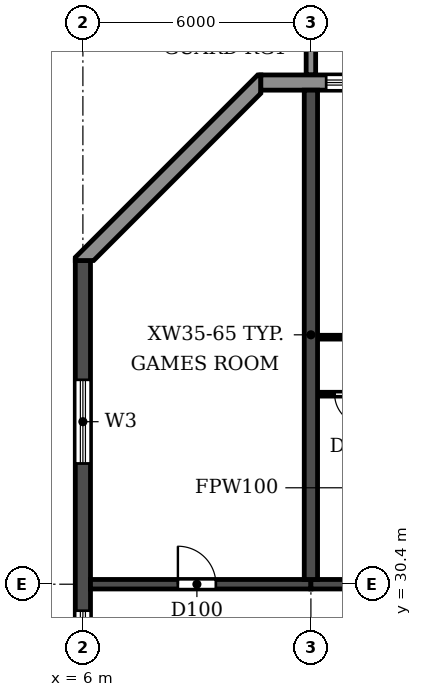
"""IFC4 building model, lengths in metres.
Left out: names, types, materials, properties, quantities, classifications, styles, units other than length and angle.
Written with IfcOpenShell. Run it as: python <this file> out.ifc"""

import sys

from ifc_helpers import new_model, si_unit, direction, frame, frame_2d, origin, place, context, subcontext, project, spatial, polyline, rectangle, outline, extrude, source, transform, mapped, element, fill, save


model = new_model("IFC4")
c1 = context("Model", 3, precision=1e-05, world=origin(), true_north=direction((0.0, 1.0)))
c2 = subcontext(c1, "Body", "Model", "MODEL_VIEW")
j1 = project(units=[si_unit("LENGTHUNIT", "METRE"), si_unit("PLANEANGLEUNIT", "RADIAN")], contexts=[c1])
p1 = place(None, origin())
s1 = spatial("IfcSite", under=j1, at=p1, CompositionType="ELEMENT")
p2 = place(p1, origin())
s2 = spatial("IfcBuilding", under=s1, at=p2, CompositionType="ELEMENT")
p3 = place(p2, frame((0.0, 0.0, 72.9)))
s3 = spatial("IfcBuildingStorey", under=s2, at=p3, CompositionType="ELEMENT", Elevation=72.9)
p4 = place(p3, frame((12.0, 30.525, 0.0), z_axis=(0.0, 0.0, 1.0), x_axis=(0.0, 1.0, 0.0)))
e1 = element("IfcWall", 1, at=p4, inside=s3, PredefinedType="SHEAR", context=c2, shape_type="SweptSolid", body=[
    extrude(rectangle(XDim=12.875, YDim=0.35, at=frame_2d((6.438, 0.0))), origin(), (0.0, 0.0, 1.0), 3.06),
])
p5 = place(p3, frame((6.0, 4.683, 0.0), z_axis=(0.0, 0.0, 1.0), x_axis=(0.0, 1.0, 0.0)))
e2 = element("IfcWall", 2, at=p5, inside=s3, PredefinedType="SHEAR", context=c2, shape_type="SweptSolid", body=[
    extrude(rectangle(XDim=34.234, YDim=0.4, at=frame_2d((17.117, 0.0))), origin(), (0.0, 0.0, 1.0), 3.06),
])
p6 = place(p5, frame((23.817, 0.0, 0.9)))
e3 = element("IfcOpeningElement", 3, at=p6, cuts=e2, PredefinedType="OPENING", context=c2, shape_type="SweptSolid", body=[
    extrude(rectangle(XDim=1.2, YDim=1.5, at=frame_2d((0.6, 0.75))), frame((0.0, 0.21, 0.0), z_axis=(0.0, -1.0, 0.0), x_axis=(1.0, 0.0, 0.0)), (0.0, 0.0, 1.0), 0.42),
])
p7 = place(p5, frame((8.017, 0.0, 0.9)))
e4 = element("IfcOpeningElement", 4, at=p7, cuts=e2, PredefinedType="OPENING", context=c2, shape_type="SweptSolid", body=[
    extrude(rectangle(XDim=1.2, YDim=1.5, at=frame_2d((0.6, 0.75))), frame((0.0, 0.21, 0.0), z_axis=(0.0, -1.0, 0.0), x_axis=(1.0, 0.0, 0.0)), (0.0, 0.0, 1.0), 0.42),
])
p8 = place(p5, frame((15.917, 0.0, 0.9)))
e5 = element("IfcOpeningElement", 5, at=p8, cuts=e2, PredefinedType="OPENING", context=c2, shape_type="SweptSolid", body=[
    extrude(rectangle(XDim=1.2, YDim=1.5, at=frame_2d((0.6, 0.75))), frame((0.0, 0.21, 0.0), z_axis=(0.0, -1.0, 0.0), x_axis=(1.0, 0.0, 0.0)), (0.0, 0.0, 1.0), 0.42),
])
p9 = place(p5, frame((28.894, 0.0, 0.6)))
e6 = element("IfcOpeningElement", 6, at=p9, cuts=e2, PredefinedType="OPENING", context=c2, shape_type="SweptSolid", body=[
    extrude(rectangle(XDim=2.2, YDim=1.8, at=frame_2d((1.1, 0.9))), frame((0.0, 0.21, 0.0), z_axis=(0.0, -1.0, 0.0), x_axis=(1.0, 0.0, 0.0)), (0.0, 0.0, 1.0), 0.42),
])
p10 = place(p5, frame((2.541, 0.0, 0.6)))
e7 = element("IfcOpeningElement", 7, at=p10, cuts=e2, PredefinedType="OPENING", context=c2, shape_type="SweptSolid", body=[
    extrude(rectangle(XDim=2.2, YDim=1.8, at=frame_2d((1.1, 0.9))), frame((0.0, 0.21, 0.0), z_axis=(0.0, -1.0, 0.0), x_axis=(1.0, 0.0, 0.0)), (0.0, 0.0, 1.0), 0.42),
])
p11 = place(p3, frame((6.2, 30.4, 0.0), z_axis=(0.0, 0.0, 1.0), x_axis=(1.0, 0.0, 0.0)))
e8 = element("IfcWall", 8, at=p11, inside=s3, PredefinedType="SHEAR", context=c2, shape_type="SweptSolid", body=[
    extrude(rectangle(XDim=5.8, YDim=0.25, at=frame_2d((2.9, 0.0))), origin(), (0.0, 0.0, 1.0), 2.46),
])
p12 = place(p11, frame((2.3, 0.0, 0.0)))
e9 = element("IfcOpeningElement", 9, at=p12, cuts=e8, PredefinedType="OPENING", context=c2, shape_type="SweptSolid", body=[
    extrude(rectangle(XDim=1.0, YDim=2.1, at=frame_2d((0.5, 1.05))), frame((0.0, 0.135, 0.0), z_axis=(0.0, -1.0, 0.0), x_axis=(1.0, 0.0, 0.0)), (0.0, 0.0, 1.0), 0.27),
])
p13 = place(p3, frame((12.0, 30.4, 0.0), z_axis=(0.0, 0.0, 1.0), x_axis=(1.0, 0.0, 0.0)))
e10 = element("IfcWall", 10, at=p13, inside=s3, PredefinedType="SHEAR", context=c2, shape_type="SweptSolid", body=[
    extrude(rectangle(XDim=6.0, YDim=0.25, at=frame_2d((3.0, 0.0))), origin(), (0.0, 0.0, 1.0), 2.46),
])
p14 = place(p13, frame((2.45, 0.0, 0.0)))
e11 = element("IfcOpeningElement", 11, at=p14, cuts=e10, PredefinedType="OPENING", context=c2, shape_type="SweptSolid", body=[
    extrude(rectangle(XDim=1.0, YDim=2.1, at=frame_2d((0.5, 1.05))), frame((0.0, 0.135, 0.0), z_axis=(0.0, -1.0, 0.0), x_axis=(1.0, 0.0, 0.0)), (0.0, 0.0, 1.0), 0.27),
])
p15 = place(p3, frame((91.317, 43.6, 0.0), z_axis=(0.0, 0.0, 1.0), x_axis=(-1.0, 0.0, 0.0)))
e12 = element("IfcWall", 12, at=p15, inside=s3, PredefinedType="STANDARD", context=c2, shape_type="SweptSolid", body=[
    extrude(rectangle(XDim=80.634, YDim=0.4, at=frame_2d((40.317, 0.0))), origin(), (0.0, 0.0, 1.0), 3.06),
])
p16 = place(p15, frame((76.717, 0.0, 0.9)))
e13 = element("IfcOpeningElement", 13, at=p16, cuts=e12, PredefinedType="OPENING", context=c2, shape_type="SweptSolid", body=[
    extrude(rectangle(XDim=2.2, YDim=1.5, at=frame_2d((1.1, 0.75))), frame((0.0, 0.21, 0.0), z_axis=(0.0, -1.0, 0.0), x_axis=(1.0, 0.0, 0.0)), (0.0, 0.0, 1.0), 0.42),
])
p17 = place(p15, frame((73.917, 0.0, 0.0)))
e14 = element("IfcOpeningElement", 14, at=p17, cuts=e12, PredefinedType="OPENING", context=c2, shape_type="SweptSolid", body=[
    extrude(rectangle(XDim=1.8, YDim=2.4, at=frame_2d((0.9, 1.2))), frame((0.0, 0.21, 0.0), z_axis=(0.0, -1.0, 0.0), x_axis=(1.0, 0.0, 0.0)), (0.0, 0.0, 1.0), 0.42),
])
p18 = place(p15, frame((70.917, 0.0, 0.0)))
e15 = element("IfcOpeningElement", 15, at=p18, cuts=e12, PredefinedType="OPENING", context=c2, shape_type="SweptSolid", body=[
    extrude(rectangle(XDim=1.8, YDim=2.4, at=frame_2d((0.9, 1.2))), frame((0.0, 0.21, 0.0), z_axis=(0.0, -1.0, 0.0), x_axis=(1.0, 0.0, 0.0)), (0.0, 0.0, 1.0), 0.42),
])
p19 = place(p15, frame((67.717, 0.0, 0.9)))
e16 = element("IfcOpeningElement", 16, at=p19, cuts=e12, PredefinedType="OPENING", context=c2, shape_type="SweptSolid", body=[
    extrude(rectangle(XDim=2.2, YDim=1.5, at=frame_2d((1.1, 0.75))), frame((0.0, 0.21, 0.0), z_axis=(0.0, -1.0, 0.0), x_axis=(1.0, 0.0, 0.0)), (0.0, 0.0, 1.0), 0.42),
])
p20 = place(p15, frame((64.717, 0.0, 0.9)))
e17 = element("IfcOpeningElement", 17, at=p20, cuts=e12, PredefinedType="OPENING", context=c2, shape_type="SweptSolid", body=[
    extrude(rectangle(XDim=2.2, YDim=1.5, at=frame_2d((1.1, 0.75))), frame((0.0, 0.21, 0.0), z_axis=(0.0, -1.0, 0.0), x_axis=(1.0, 0.0, 0.0)), (0.0, 0.0, 1.0), 0.42),
])
p21 = place(p15, frame((61.917, 0.0, 0.0)))
e18 = element("IfcOpeningElement", 18, at=p21, cuts=e12, PredefinedType="OPENING", context=c2, shape_type="SweptSolid", body=[
    extrude(rectangle(XDim=1.8, YDim=2.4, at=frame_2d((0.9, 1.2))), frame((0.0, 0.21, 0.0), z_axis=(0.0, -1.0, 0.0), x_axis=(1.0, 0.0, 0.0)), (0.0, 0.0, 1.0), 0.42),
])
p22 = place(p15, frame((58.717, 0.0, 0.9)))
e19 = element("IfcOpeningElement", 19, at=p22, cuts=e12, PredefinedType="OPENING", context=c2, shape_type="SweptSolid", body=[
    extrude(rectangle(XDim=2.2, YDim=1.5, at=frame_2d((1.1, 0.75))), frame((0.0, 0.21, 0.0), z_axis=(0.0, -1.0, 0.0), x_axis=(1.0, 0.0, 0.0)), (0.0, 0.0, 1.0), 0.42),
])
p23 = place(p15, frame((55.917, 0.0, 0.0)))
e20 = element("IfcOpeningElement", 20, at=p23, cuts=e12, PredefinedType="OPENING", context=c2, shape_type="SweptSolid", body=[
    extrude(rectangle(XDim=1.8, YDim=2.4, at=frame_2d((0.9, 1.2))), frame((0.0, 0.21, 0.0), z_axis=(0.0, -1.0, 0.0), x_axis=(1.0, 0.0, 0.0)), (0.0, 0.0, 1.0), 0.42),
])
p24 = place(p15, frame((52.717, 0.0, 0.9)))
e21 = element("IfcOpeningElement", 21, at=p24, cuts=e12, PredefinedType="OPENING", context=c2, shape_type="SweptSolid", body=[
    extrude(rectangle(XDim=2.2, YDim=1.5, at=frame_2d((1.1, 0.75))), frame((0.0, 0.21, 0.0), z_axis=(0.0, -1.0, 0.0), x_axis=(1.0, 0.0, 0.0)), (0.0, 0.0, 1.0), 0.42),
])
p25 = place(p15, frame((49.717, 0.0, 0.9)))
e22 = element("IfcOpeningElement", 22, at=p25, cuts=e12, PredefinedType="OPENING", context=c2, shape_type="SweptSolid", body=[
    extrude(rectangle(XDim=2.2, YDim=1.5, at=frame_2d((1.1, 0.75))), frame((0.0, 0.21, 0.0), z_axis=(0.0, -1.0, 0.0), x_axis=(1.0, 0.0, 0.0)), (0.0, 0.0, 1.0), 0.42),
])
p26 = place(p15, frame((46.917, 0.0, 0.0)))
e23 = element("IfcOpeningElement", 23, at=p26, cuts=e12, PredefinedType="OPENING", context=c2, shape_type="SweptSolid", body=[
    extrude(rectangle(XDim=1.8, YDim=2.4, at=frame_2d((0.9, 1.2))), frame((0.0, 0.21, 0.0), z_axis=(0.0, -1.0, 0.0), x_axis=(1.0, 0.0, 0.0)), (0.0, 0.0, 1.0), 0.42),
])
p27 = place(p15, frame((43.717, 0.0, 0.9)))
e24 = element("IfcOpeningElement", 24, at=p27, cuts=e12, PredefinedType="OPENING", context=c2, shape_type="SweptSolid", body=[
    extrude(rectangle(XDim=2.2, YDim=1.5, at=frame_2d((1.1, 0.75))), frame((0.0, 0.21, 0.0), z_axis=(0.0, -1.0, 0.0), x_axis=(1.0, 0.0, 0.0)), (0.0, 0.0, 1.0), 0.42),
])
p28 = place(p15, frame((40.717, 0.0, 0.9)))
e25 = element("IfcOpeningElement", 25, at=p28, cuts=e12, PredefinedType="OPENING", context=c2, shape_type="SweptSolid", body=[
    extrude(rectangle(XDim=2.2, YDim=1.5, at=frame_2d((1.1, 0.75))), frame((0.0, 0.21, 0.0), z_axis=(0.0, -1.0, 0.0), x_axis=(1.0, 0.0, 0.0)), (0.0, 0.0, 1.0), 0.42),
])
p29 = place(p15, frame((37.917, 0.0, 0.0)))
e26 = element("IfcOpeningElement", 26, at=p29, cuts=e12, PredefinedType="OPENING", context=c2, shape_type="SweptSolid", body=[
    extrude(rectangle(XDim=1.8, YDim=2.4, at=frame_2d((0.9, 1.2))), frame((0.0, 0.21, 0.0), z_axis=(0.0, -1.0, 0.0), x_axis=(1.0, 0.0, 0.0)), (0.0, 0.0, 1.0), 0.42),
])
p30 = place(p15, frame((34.717, 0.0, 0.9)))
e27 = element("IfcOpeningElement", 27, at=p30, cuts=e12, PredefinedType="OPENING", context=c2, shape_type="SweptSolid", body=[
    extrude(rectangle(XDim=2.2, YDim=1.5, at=frame_2d((1.1, 0.75))), frame((0.0, 0.21, 0.0), z_axis=(0.0, -1.0, 0.0), x_axis=(1.0, 0.0, 0.0)), (0.0, 0.0, 1.0), 0.42),
])
p31 = place(p15, frame((31.917, 0.0, 0.0)))
e28 = element("IfcOpeningElement", 28, at=p31, cuts=e12, PredefinedType="OPENING", context=c2, shape_type="SweptSolid", body=[
    extrude(rectangle(XDim=1.8, YDim=2.4, at=frame_2d((0.9, 1.2))), frame((0.0, 0.21, 0.0), z_axis=(0.0, -1.0, 0.0), x_axis=(1.0, 0.0, 0.0)), (0.0, 0.0, 1.0), 0.42),
])
p32 = place(p15, frame((28.717, 0.0, 0.9)))
e29 = element("IfcOpeningElement", 29, at=p32, cuts=e12, PredefinedType="OPENING", context=c2, shape_type="SweptSolid", body=[
    extrude(rectangle(XDim=2.2, YDim=1.5, at=frame_2d((1.1, 0.75))), frame((0.0, 0.21, 0.0), z_axis=(0.0, -1.0, 0.0), x_axis=(1.0, 0.0, 0.0)), (0.0, 0.0, 1.0), 0.42),
])
p33 = place(p15, frame((25.717, 0.0, 0.9)))
e30 = element("IfcOpeningElement", 30, at=p33, cuts=e12, PredefinedType="OPENING", context=c2, shape_type="SweptSolid", body=[
    extrude(rectangle(XDim=2.2, YDim=1.5, at=frame_2d((1.1, 0.75))), frame((0.0, 0.21, 0.0), z_axis=(0.0, -1.0, 0.0), x_axis=(1.0, 0.0, 0.0)), (0.0, 0.0, 1.0), 0.42),
])
p34 = place(p15, frame((22.717, 0.0, 0.9)))
e31 = element("IfcOpeningElement", 31, at=p34, cuts=e12, PredefinedType="OPENING", context=c2, shape_type="SweptSolid", body=[
    extrude(rectangle(XDim=2.2, YDim=1.5, at=frame_2d((1.1, 0.75))), frame((0.0, 0.21, 0.0), z_axis=(0.0, -1.0, 0.0), x_axis=(1.0, 0.0, 0.0)), (0.0, 0.0, 1.0), 0.42),
])
p35 = place(p15, frame((19.917, 0.0, 0.0)))
e32 = element("IfcOpeningElement", 32, at=p35, cuts=e12, PredefinedType="OPENING", context=c2, shape_type="SweptSolid", body=[
    extrude(rectangle(XDim=1.8, YDim=2.4, at=frame_2d((0.9, 1.2))), frame((0.0, 0.21, 0.0), z_axis=(0.0, -1.0, 0.0), x_axis=(1.0, 0.0, 0.0)), (0.0, 0.0, 1.0), 0.42),
])
p36 = place(p15, frame((16.717, 0.0, 0.9)))
e33 = element("IfcOpeningElement", 33, at=p36, cuts=e12, PredefinedType="OPENING", context=c2, shape_type="SweptSolid", body=[
    extrude(rectangle(XDim=2.2, YDim=1.5, at=frame_2d((1.1, 0.75))), frame((0.0, 0.21, 0.0), z_axis=(0.0, -1.0, 0.0), x_axis=(1.0, 0.0, 0.0)), (0.0, 0.0, 1.0), 0.42),
])
p37 = place(p15, frame((13.717, 0.0, 0.9)))
e34 = element("IfcOpeningElement", 34, at=p37, cuts=e12, PredefinedType="OPENING", context=c2, shape_type="SweptSolid", body=[
    extrude(rectangle(XDim=2.2, YDim=1.5, at=frame_2d((1.1, 0.75))), frame((0.0, 0.21, 0.0), z_axis=(0.0, -1.0, 0.0), x_axis=(1.0, 0.0, 0.0)), (0.0, 0.0, 1.0), 0.42),
])
p38 = place(p15, frame((10.717, 0.0, 0.9)))
e35 = element("IfcOpeningElement", 35, at=p38, cuts=e12, PredefinedType="OPENING", context=c2, shape_type="SweptSolid", body=[
    extrude(rectangle(XDim=2.2, YDim=1.5, at=frame_2d((1.1, 0.75))), frame((0.0, 0.21, 0.0), z_axis=(0.0, -1.0, 0.0), x_axis=(1.0, 0.0, 0.0)), (0.0, 0.0, 1.0), 0.42),
])
p39 = place(p15, frame((7.917, 0.0, 0.0)))
e36 = element("IfcOpeningElement", 36, at=p39, cuts=e12, PredefinedType="OPENING", context=c2, shape_type="SweptSolid", body=[
    extrude(rectangle(XDim=1.8, YDim=2.4, at=frame_2d((0.9, 1.2))), frame((0.0, 0.21, 0.0), z_axis=(0.0, -1.0, 0.0), x_axis=(1.0, 0.0, 0.0)), (0.0, 0.0, 1.0), 0.42),
])
p40 = place(p15, frame((4.717, 0.0, 0.9)))
e37 = element("IfcOpeningElement", 37, at=p40, cuts=e12, PredefinedType="OPENING", context=c2, shape_type="SweptSolid", body=[
    extrude(rectangle(XDim=2.2, YDim=1.5, at=frame_2d((1.1, 0.75))), frame((0.0, 0.21, 0.0), z_axis=(0.0, -1.0, 0.0), x_axis=(1.0, 0.0, 0.0)), (0.0, 0.0, 1.0), 0.42),
])
p41 = place(p15, frame((1.917, 0.0, 0.0)))
e38 = element("IfcOpeningElement", 38, at=p41, cuts=e12, PredefinedType="OPENING", context=c2, shape_type="SweptSolid", body=[
    extrude(rectangle(XDim=1.8, YDim=2.4, at=frame_2d((0.9, 1.2))), frame((0.0, 0.21, 0.0), z_axis=(0.0, -1.0, 0.0), x_axis=(1.0, 0.0, 0.0)), (0.0, 0.0, 1.0), 0.42),
])
p42 = place(p3, origin())
e39 = element("IfcWall", 39, at=p42, inside=s3, PredefinedType="STANDARD", context=c2, shape_type="SweptSolid", body=[
    extrude(outline(polyline([(10.683, 43.8), (10.6, 43.8), (5.8, 39.0), (5.8, 38.917), (6.283, 38.917), (10.683, 43.317), (10.683, 43.8)])), origin(), (0.0, 0.0, 1.0), 3.06),
])
m1 = source(origin(), c2, "Body", "SweptSolid", [
    extrude(outline(polyline([(0.0, 0.0), (0.25, 0.0), (0.25, 3.1), (0.0, 3.1), (0.0, 0.0)])), origin(), (0.0, 0.0, 1.0), 3.1),
])
p43 = place(p3, frame((11.875, 43.8, 0.0)))
e40 = element("IfcWall", 40, at=p43, inside=s3, PredefinedType="STANDARD", context=c2, shape_type="MappedRepresentation", body=[
    mapped(m1, transform((0.0, 0.0, 0.0))),
])
p44 = place(p3, frame((12.185, 35.4, 0.0), z_axis=(0.0, 0.0, 1.0), x_axis=(1.0, 0.0, 0.0)))
e41 = element("IfcWall", 41, at=p44, inside=s3, PredefinedType="PARTITIONING", context=c2, shape_type="SweptSolid", body=[
    extrude(rectangle(XDim=1.915, YDim=0.1, at=frame_2d((0.958, 0.0))), origin(), (0.0, 0.0, 1.0), 3.06),
])
p45 = place(p44, frame((0.44, 0.0, 0.0)))
e42 = element("IfcOpeningElement", 42, at=p45, cuts=e41, PredefinedType="OPENING", context=c2, shape_type="SweptSolid", body=[
    extrude(rectangle(XDim=0.8, YDim=2.1, at=frame_2d((0.4, 1.05))), frame((0.0, 0.06, 0.0), z_axis=(0.0, -1.0, 0.0), x_axis=(1.0, 0.0, 0.0)), (0.0, 0.0, 1.0), 0.12),
])
p46 = place(p3, frame((12.185, 36.9, 0.0), z_axis=(0.0, 0.0, 1.0), x_axis=(1.0, 0.0, 0.0)))
e43 = element("IfcWall", 43, at=p46, inside=s3, PredefinedType="PARTITIONING", context=c2, shape_type="SweptSolid", body=[
    extrude(rectangle(XDim=2.865, YDim=0.1, at=frame_2d((1.433, 0.0))), origin(), (0.0, 0.0, 1.0), 3.06),
])
p47 = place(p46, frame((1.415, 0.0, 0.0)))
e44 = element("IfcOpeningElement", 44, at=p47, cuts=e43, PredefinedType="OPENING", context=c2, shape_type="SweptSolid", body=[
    extrude(rectangle(XDim=0.9, YDim=2.1, at=frame_2d((0.45, 1.05))), frame((0.0, 0.06, 0.0), z_axis=(0.0, -1.0, 0.0), x_axis=(1.0, 0.0, 0.0)), (0.0, 0.0, 1.0), 0.12),
])
p48 = place(p16, origin())
e45 = element("IfcWindow", 45, at=p48, inside=s3, PartitioningType="DOUBLE_PANEL_HORIZONTAL", PredefinedType="WINDOW", context=c2, shape_type="SweptSolid", body=[
    extrude(rectangle(XDim=2.2, YDim=1.5, at=frame_2d((1.1, 0.75))), frame((0.0, 0.03, 0.0), z_axis=(0.0, -1.0, 0.0), x_axis=(1.0, 0.0, 0.0)), (0.0, 0.0, 1.0), 0.06),
])
fill(e13, e45)
p49 = place(p6, origin())
e46 = element("IfcWindow", 46, at=p49, inside=s3, PartitioningType="SINGLE_PANEL", PredefinedType="WINDOW", context=c2, shape_type="SweptSolid", body=[
    extrude(rectangle(XDim=1.2, YDim=1.5, at=frame_2d((0.6, 0.75))), frame((0.0, 0.03, 0.0), z_axis=(0.0, -1.0, 0.0), x_axis=(1.0, 0.0, 0.0)), (0.0, 0.0, 1.0), 0.06),
])
fill(e3, e46)
p50 = place(p9, origin())
e47 = element("IfcWindow", 47, at=p50, inside=s3, PartitioningType="DOUBLE_PANEL_HORIZONTAL", PredefinedType="WINDOW", context=c2, shape_type="SweptSolid", body=[
    extrude(rectangle(XDim=2.2, YDim=1.8, at=frame_2d((1.1, 0.9))), frame((0.0, 0.03, 0.0), z_axis=(0.0, -1.0, 0.0), x_axis=(1.0, 0.0, 0.0)), (0.0, 0.0, 1.0), 0.06),
])
fill(e6, e47)
p51 = place(p12, origin())
e48 = element("IfcDoor", 48, at=p51, inside=s3, OperationType="SINGLE_SWING_LEFT", PredefinedType="DOOR", context=c2, shape_type="SweptSolid", body=[
    extrude(rectangle(XDim=1.0, YDim=2.1, at=frame_2d((0.5, 1.05))), frame((0.0, 0.025, 0.0), z_axis=(0.0, -1.0, 0.0), x_axis=(1.0, 0.0, 0.0)), (0.0, 0.0, 1.0), 0.05),
])
fill(e9, e48)
p52 = place(p45, frame((0.8, 0.0, 0.0), z_axis=(0.0, 0.0, 1.0), x_axis=(-1.0, 0.0, 0.0)))
e49 = element("IfcDoor", 49, at=p52, inside=s3, OperationType="SINGLE_SWING_LEFT", PredefinedType="DOOR", context=c2, shape_type="SweptSolid", body=[
    extrude(rectangle(XDim=0.8, YDim=2.1, at=frame_2d((0.4, 1.05))), frame((0.0, 0.025, 0.0), z_axis=(0.0, -1.0, 0.0), x_axis=(1.0, 0.0, 0.0)), (0.0, 0.0, 1.0), 0.05),
])
fill(e42, e49)
save(model, sys.argv[1])
